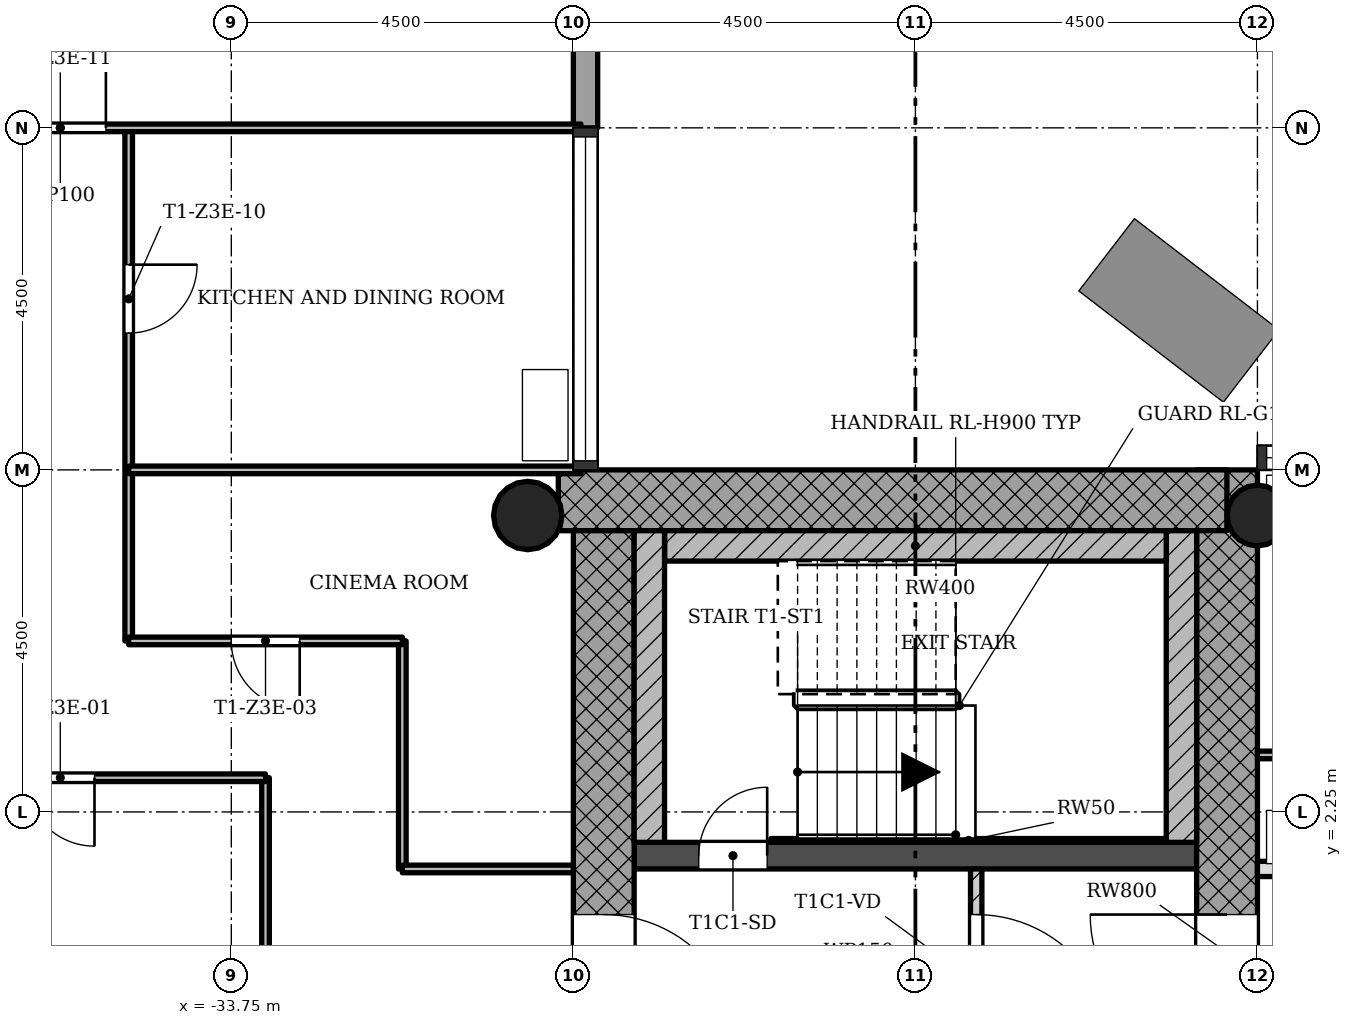
"""IFC4 building model, lengths in metres.
Left out: names, types, materials, properties, quantities, classifications, styles, units other than length and angle.
Written with IfcOpenShell. Run it as: python <this file> out.ifc"""

import sys

from ifc_helpers import new_model, si_unit, direction, frame, frame_2d, origin, origin_2d, place, context, subcontext, project, spatial, rectangle, hollow_circle, extrude, element, fill, save


model = new_model("IFC4")
c1 = context("Model", 3, precision=1e-05, world=origin(), true_north=direction((0.0, 1.0)))
c2 = subcontext(c1, "Body", "Model", "MODEL_VIEW")
j1 = project(units=[si_unit("LENGTHUNIT", "METRE"), si_unit("PLANEANGLEUNIT", "RADIAN")], contexts=[c1])
p1 = place(None, origin())
s1 = spatial("IfcSite", under=j1, at=p1, CompositionType="ELEMENT")
p2 = place(p1, origin())
s2 = spatial("IfcBuilding", under=s1, at=p2, CompositionType="ELEMENT")
p3 = place(p2, frame((0.0, 0.0, 177.9)))
s3 = spatial("IfcBuildingStorey", under=s2, at=p3, CompositionType="ELEMENT", Elevation=177.9)
p4 = place(p3, frame((-20.65, -5.95, 0.0), z_axis=(0.0, 0.0, 1.0), x_axis=(0.0, 1.0, 0.0)))
e1 = element("IfcWall", 1, at=p4, inside=s3, PredefinedType="SHEAR", context=c2, shape_type="SweptSolid", body=[
    extrude(rectangle(XDim=12.7, YDim=0.8, at=frame_2d((6.35, 0.0))), origin(), (0.0, 0.0, 1.0), 3.4),
])
p5 = place(p4, frame((5.05, 0.0, 0.0)))
e2 = element("IfcOpeningElement", 2, at=p5, cuts=e1, PredefinedType="OPENING", context=c2, shape_type="SweptSolid", body=[
    extrude(rectangle(XDim=1.8, YDim=2.1, at=frame_2d((0.9, 1.05))), frame((0.0, 0.41, 0.0), z_axis=(0.0, -1.0, 0.0), x_axis=(1.0, 0.0, 0.0)), (0.0, 0.0, 1.0), 0.82),
])
p6 = place(p3, frame((-20.652, 6.35, 0.0), z_axis=(0.0, 0.0, 1.0), x_axis=(-1.0, 0.0, 0.0)))
e3 = element("IfcWall", 3, at=p6, inside=s3, PredefinedType="SHEAR", context=c2, shape_type="SweptSolid", body=[
    extrude(rectangle(XDim=8.796, YDim=0.8, at=frame_2d((4.398, 0.0))), origin(), (0.0, 0.0, 1.0), 3.4),
])
p7 = place(p3, frame((-28.85, 5.95, 0.0), z_axis=(0.0, 0.0, 1.0), x_axis=(0.0, -1.0, 0.0)))
e4 = element("IfcWall", 4, at=p7, inside=s3, PredefinedType="SHEAR", context=c2, shape_type="SweptSolid", body=[
    extrude(rectangle(XDim=12.7, YDim=0.8, at=frame_2d((6.35, 0.0))), origin(), (0.0, 0.0, 1.0), 3.4),
])
p8 = place(p7, frame((5.05, 0.0, 0.0)))
e5 = element("IfcOpeningElement", 5, at=p8, cuts=e4, PredefinedType="OPENING", context=c2, shape_type="SweptSolid", body=[
    extrude(rectangle(XDim=1.8, YDim=2.1, at=frame_2d((0.9, 1.05))), frame((0.0, 0.41, 0.0), z_axis=(0.0, -1.0, 0.0), x_axis=(1.0, 0.0, 0.0)), (0.0, 0.0, 1.0), 0.82),
])
p9 = place(p3, frame((-28.45, 1.675, 0.0), z_axis=(0.0, 0.0, 1.0), x_axis=(1.0, 0.0, 0.0)))
e6 = element("IfcWall", 6, at=p9, inside=s3, PredefinedType="SHEAR", context=c2, shape_type="SweptSolid", body=[
    extrude(rectangle(XDim=7.4, YDim=0.35, at=frame_2d((3.7, 0.0))), origin(), (0.0, 0.0, 1.0), 3.4),
])
p10 = place(p9, frame((0.85, 0.0, 0.0)))
e7 = element("IfcOpeningElement", 7, at=p10, cuts=e6, PredefinedType="OPENING", context=c2, shape_type="SweptSolid", body=[
    extrude(rectangle(XDim=0.9, YDim=2.1, at=frame_2d((0.45, 1.05))), frame((0.0, 0.185, 0.0), z_axis=(0.0, -1.0, 0.0), x_axis=(1.0, 0.0, 0.0)), (0.0, 0.0, 1.0), 0.37),
])
p11 = place(p3, frame((-20.25, 6.15, 0.0), z_axis=(0.0, 0.0, 1.0), x_axis=(1.0, 0.0, 0.0)))
e8 = element("IfcColumn", 8, at=p11, inside=s3, PredefinedType="COLUMN", context=c2, shape_type="SweptSolid", body=[
    extrude(hollow_circle(Radius=0.4, WallThickness=0.028, at=origin_2d()), origin(), (0.0, 0.0, 1.0), 3.4),
])
p12 = place(p3, frame((-29.85, 6.15, 0.0), z_axis=(0.0, 0.0, 1.0), x_axis=(1.0, 0.0, 0.0)))
e9 = element("IfcColumn", 9, at=p12, inside=s3, PredefinedType="COLUMN", context=c2, shape_type="SweptSolid", body=[
    extrude(hollow_circle(Radius=0.45, WallThickness=0.032, at=origin_2d()), origin(), (0.0, 0.0, 1.0), 3.4),
])
p13 = place(p3, frame((-29.09, 11.25, -0.3), z_axis=(0.0, 0.0, 1.0), x_axis=(0.0, 1.0, 0.0)))
e10 = element("IfcWall", 10, at=p13, inside=s3, PredefinedType="STANDARD", context=c2, shape_type="SweptSolid", body=[
    extrude(rectangle(XDim=1.82, YDim=0.32, at=frame_2d((0.91, 0.0))), origin(), (0.0, 0.0, 1.0), 3.4),
])
p14 = place(p3, frame((-23.95, -1.5, 0.0), z_axis=(0.0, 0.0, 1.0), x_axis=(0.0, 1.0, 0.0)))
e11 = element("IfcWall", 11, at=p14, inside=s3, PredefinedType="PARTITIONING", context=c2, shape_type="SweptSolid", body=[
    extrude(rectangle(XDim=3.0, YDim=0.15, at=frame_2d((1.5, 0.0))), origin(), (0.0, 0.0, 1.0), 3.0),
])
p15 = place(p14, frame((0.6, 0.0, 0.0)))
e12 = element("IfcOpeningElement", 12, at=p15, cuts=e11, PredefinedType="OPENING", context=c2, shape_type="SweptSolid", body=[
    extrude(rectangle(XDim=1.8, YDim=2.1, at=frame_2d((0.9, 1.05))), frame((0.0, 0.085, 0.0), z_axis=(0.0, -1.0, 0.0), x_axis=(1.0, 0.0, 0.0)), (0.0, 0.0, 1.0), 0.17),
])
p16 = place(p3, frame((-35.1, 4.5, 0.0), z_axis=(0.0, 0.0, 1.0), x_axis=(0.0, 1.0, 0.0)))
e13 = element("IfcWall", 13, at=p16, inside=s3, PredefinedType="PARTITIONING", context=c2, shape_type="SweptSolid", body=[
    extrude(rectangle(XDim=6.75, YDim=0.1, at=frame_2d((3.375, 0.0))), origin(), (0.0, 0.0, 1.0), 3.0),
])
p17 = place(p16, frame((4.05, 0.0, 0.0)))
e14 = element("IfcOpeningElement", 14, at=p17, cuts=e13, PredefinedType="OPENING", context=c2, shape_type="SweptSolid", body=[
    extrude(rectangle(XDim=0.9, YDim=2.1, at=frame_2d((0.45, 1.05))), frame((0.0, 0.06, 0.0), z_axis=(0.0, -1.0, 0.0), x_axis=(1.0, 0.0, 0.0)), (0.0, 0.0, 1.0), 0.12),
])
p18 = place(p3, frame((-33.3, -2.7, 0.0), z_axis=(0.0, 0.0, 1.0), x_axis=(0.0, 1.0, 0.0)))
e15 = element("IfcWall", 15, at=p18, inside=s3, PredefinedType="PARTITIONING", context=c2, shape_type="SweptSolid", body=[
    extrude(rectangle(XDim=5.4, YDim=0.1, at=frame_2d((2.7, 0.0))), origin(), (0.0, 0.0, 1.0), 3.0),
])
p19 = place(p3, frame((-31.5, 1.5, 0.0), z_axis=(0.0, 0.0, 1.0), x_axis=(0.0, 1.0, 0.0)))
e16 = element("IfcWall", 16, at=p19, inside=s3, PredefinedType="PARTITIONING", context=c2, shape_type="SweptSolid", body=[
    extrude(rectangle(XDim=3.0, YDim=0.1, at=frame_2d((1.5, 0.0))), origin(), (0.0, 0.0, 1.0), 3.0),
])
p20 = place(p3, frame((-31.5, 1.5, 0.0), z_axis=(0.0, 0.0, 1.0), x_axis=(1.0, 0.0, 0.0)))
e17 = element("IfcWall", 17, at=p20, inside=s3, PredefinedType="PARTITIONING", context=c2, shape_type="SweptSolid", body=[
    extrude(rectangle(XDim=2.25, YDim=0.1, at=frame_2d((1.125, 0.0))), origin(), (0.0, 0.0, 1.0), 3.0),
])
p21 = place(p3, frame((-20.25, 1.5, 0.0), z_axis=(0.0, 0.0, 1.0), x_axis=(1.0, 0.0, 0.0)))
e18 = element("IfcWall", 18, at=p21, inside=s3, PredefinedType="SOLIDWALL", context=c2, shape_type="SweptSolid", body=[
    extrude(rectangle(XDim=4.5, YDim=0.2, at=frame_2d((2.25, 0.0))), origin(), (0.0, 0.0, 1.0), 3.0),
])
p22 = place(p21, frame((3.0, 0.0, 0.0)))
e19 = element("IfcOpeningElement", 19, at=p22, cuts=e18, PredefinedType="OPENING", context=c2, shape_type="SweptSolid", body=[
    extrude(rectangle(XDim=0.9, YDim=2.1, at=frame_2d((0.45, 1.05))), frame((0.0, 0.11, 0.0), z_axis=(0.0, -1.0, 0.0), x_axis=(1.0, 0.0, 0.0)), (0.0, 0.0, 1.0), 0.22),
])
p23 = place(p3, frame((-38.7, 2.7, 0.0), z_axis=(0.0, 0.0, 1.0), x_axis=(1.0, 0.0, 0.0)))
e20 = element("IfcWall", 20, at=p23, inside=s3, PredefinedType="PARTITIONING", context=c2, shape_type="SweptSolid", body=[
    extrude(rectangle(XDim=5.4, YDim=0.1, at=frame_2d((2.7, 0.0))), origin(), (0.0, 0.0, 1.0), 3.0),
])
p24 = place(p23, frame((2.25, 0.0, 0.0)))
e21 = element("IfcOpeningElement", 21, at=p24, cuts=e20, PredefinedType="OPENING", context=c2, shape_type="SweptSolid", body=[
    extrude(rectangle(XDim=0.9, YDim=2.1, at=frame_2d((0.45, 1.05))), frame((0.0, 0.06, 0.0), z_axis=(0.0, -1.0, 0.0), x_axis=(1.0, 0.0, 0.0)), (0.0, 0.0, 1.0), 0.12),
])
p25 = place(p3, frame((-20.25, 3.0, 0.0), z_axis=(0.0, 0.0, 1.0), x_axis=(1.0, 0.0, 0.0)))
e22 = element("IfcWall", 22, at=p25, inside=s3, PredefinedType="PARTITIONING", context=c2, shape_type="SweptSolid", body=[
    extrude(rectangle(XDim=2.4, YDim=0.1, at=frame_2d((1.2, 0.0))), origin(), (0.0, 0.0, 1.0), 3.0),
])
p26 = place(p25, frame((0.75, 0.0, 0.0)))
e23 = element("IfcOpeningElement", 23, at=p26, cuts=e22, PredefinedType="OPENING", context=c2, shape_type="SweptSolid", body=[
    extrude(rectangle(XDim=0.9, YDim=2.1, at=frame_2d((0.45, 1.05))), frame((0.0, 0.06, 0.0), z_axis=(0.0, -1.0, 0.0), x_axis=(1.0, 0.0, 0.0)), (0.0, 0.0, 1.0), 0.12),
])
p27 = place(p3, frame((-35.1, 4.5, 0.0), z_axis=(0.0, 0.0, 1.0), x_axis=(1.0, 0.0, 0.0)))
e24 = element("IfcWall", 24, at=p27, inside=s3, PredefinedType="PARTITIONING", context=c2, shape_type="SweptSolid", body=[
    extrude(rectangle(XDim=3.6, YDim=0.1, at=frame_2d((1.8, 0.0))), origin(), (0.0, 0.0, 1.0), 3.0),
])
p28 = place(p27, frame((1.35, 0.0, 0.0)))
e25 = element("IfcOpeningElement", 25, at=p28, cuts=e24, PredefinedType="OPENING", context=c2, shape_type="SweptSolid", body=[
    extrude(rectangle(XDim=0.9, YDim=2.1, at=frame_2d((0.45, 1.05))), frame((0.0, 0.06, 0.0), z_axis=(0.0, -1.0, 0.0), x_axis=(1.0, 0.0, 0.0)), (0.0, 0.0, 1.0), 0.12),
])
p29 = place(p3, frame((-35.1, 6.75, 0.0), z_axis=(0.0, 0.0, 1.0), x_axis=(1.0, 0.0, 0.0)))
e26 = element("IfcWall", 26, at=p29, inside=s3, PredefinedType="PARTITIONING", context=c2, shape_type="SweptSolid", body=[
    extrude(rectangle(XDim=5.95, YDim=0.1, at=frame_2d((2.975, 0.0))), origin(), (0.0, 0.0, 1.0), 3.0),
])
p30 = place(p3, frame((-42.85, 11.25, 0.0), z_axis=(0.0, 0.0, 1.0), x_axis=(1.0, 0.0, 0.0)))
e27 = element("IfcWall", 27, at=p30, inside=s3, PredefinedType="PARTITIONING", context=c2, shape_type="SweptSolid", body=[
    extrude(rectangle(XDim=13.7, YDim=0.1, at=frame_2d((6.85, 0.0))), origin(), (0.0, 0.0, 1.0), 3.0),
])
p31 = place(p30, frame((6.25, 0.0, 0.0)))
e28 = element("IfcOpeningElement", 28, at=p31, cuts=e27, PredefinedType="OPENING", context=c2, shape_type="SweptSolid", body=[
    extrude(rectangle(XDim=1.2, YDim=2.1, at=frame_2d((0.6, 1.05))), frame((0.0, 0.06, 0.0), z_axis=(0.0, -1.0, 0.0), x_axis=(1.0, 0.0, 0.0)), (0.0, 0.0, 1.0), 0.12),
])
p32 = place(p3, frame((-21.25, 1.85, 0.0), z_axis=(0.0, 0.0, 1.0), x_axis=(0.0, 1.0, 0.0)))
e29 = element("IfcWall", 29, at=p32, inside=s3, PredefinedType="SHEAR", context=c2, shape_type="SweptSolid", body=[
    extrude(rectangle(XDim=4.1, YDim=0.4, at=frame_2d((2.05, 0.0))), origin(), (0.0, 0.0, 1.0), 3.4),
])
p33 = place(p3, frame((-28.05, 5.75, 0.0), z_axis=(0.0, 0.0, 1.0), x_axis=(1.0, 0.0, 0.0)))
e30 = element("IfcWall", 30, at=p33, inside=s3, PredefinedType="SHEAR", context=c2, shape_type="SweptSolid", body=[
    extrude(rectangle(XDim=6.6, YDim=0.4, at=frame_2d((3.3, 0.0))), origin(), (0.0, 0.0, 1.0), 3.4),
])
p34 = place(p3, frame((-28.25, 1.85, 0.0), z_axis=(0.0, 0.0, 1.0), x_axis=(0.0, 1.0, 0.0)))
e31 = element("IfcWall", 31, at=p34, inside=s3, PredefinedType="SHEAR", context=c2, shape_type="SweptSolid", body=[
    extrude(rectangle(XDim=4.1, YDim=0.4, at=frame_2d((2.05, 0.0))), origin(), (0.0, 0.0, 1.0), 3.4),
])
p35 = place(p3, frame((-26.65, 1.875, 0.0), z_axis=(0.0, 0.0, 1.0), x_axis=(1.0, 0.0, 0.0)))
e32 = element("IfcWall", 32, at=p35, inside=s3, PredefinedType="SHEAR", context=c2, shape_type="SweptSolid", body=[
    extrude(rectangle(XDim=5.2, YDim=0.05, at=frame_2d((2.6, 0.0))), origin(), (0.0, 0.0, 1.0), 3.4),
])
p36 = place(p15, origin())
e33 = element("IfcDoor", 33, at=p36, inside=s3, OperationType="SINGLE_SWING_LEFT", PredefinedType="DOOR", context=c2, shape_type="SweptSolid", body=[
    extrude(rectangle(XDim=1.8, YDim=2.1, at=frame_2d((0.9, 1.05))), frame((0.0, 0.025, 0.0), z_axis=(0.0, -1.0, 0.0), x_axis=(1.0, 0.0, 0.0)), (0.0, 0.0, 1.0), 0.05),
])
fill(e12, e33)
p37 = place(p24, origin())
e34 = element("IfcDoor", 34, at=p37, inside=s3, OperationType="SINGLE_SWING_RIGHT", PredefinedType="DOOR", context=c2, shape_type="SweptSolid", body=[
    extrude(rectangle(XDim=0.9, YDim=2.1, at=frame_2d((0.45, 1.05))), frame((0.0, 0.025, 0.0), z_axis=(0.0, -1.0, 0.0), x_axis=(1.0, 0.0, 0.0)), (0.0, 0.0, 1.0), 0.05),
])
fill(e21, e34)
p38 = place(p28, origin())
e35 = element("IfcDoor", 35, at=p38, inside=s3, OperationType="SINGLE_SWING_RIGHT", PredefinedType="DOOR", context=c2, shape_type="SweptSolid", body=[
    extrude(rectangle(XDim=0.9, YDim=2.1, at=frame_2d((0.45, 1.05))), frame((0.0, 0.025, 0.0), z_axis=(0.0, -1.0, 0.0), x_axis=(1.0, 0.0, 0.0)), (0.0, 0.0, 1.0), 0.05),
])
fill(e25, e35)
p39 = place(p17, origin())
e36 = element("IfcDoor", 36, at=p39, inside=s3, OperationType="SINGLE_SWING_RIGHT", PredefinedType="DOOR", context=c2, shape_type="SweptSolid", body=[
    extrude(rectangle(XDim=0.9, YDim=2.1, at=frame_2d((0.45, 1.05))), frame((0.0, 0.025, 0.0), z_axis=(0.0, -1.0, 0.0), x_axis=(1.0, 0.0, 0.0)), (0.0, 0.0, 1.0), 0.05),
])
fill(e14, e36)
p40 = place(p31, origin())
e37 = element("IfcDoor", 37, at=p40, inside=s3, OperationType="SINGLE_SWING_LEFT", PredefinedType="DOOR", context=c2, shape_type="SweptSolid", body=[
    extrude(rectangle(XDim=1.2, YDim=2.1, at=frame_2d((0.6, 1.05))), frame((0.0, 0.025, 0.0), z_axis=(0.0, -1.0, 0.0), x_axis=(1.0, 0.0, 0.0)), (0.0, 0.0, 1.0), 0.05),
])
fill(e28, e37)
p41 = place(p10, origin())
e38 = element("IfcDoor", 38, at=p41, inside=s3, OperationType="SINGLE_SWING_LEFT", PredefinedType="DOOR", context=c2, shape_type="SweptSolid", body=[
    extrude(rectangle(XDim=0.9, YDim=2.1, at=frame_2d((0.45, 1.05))), frame((0.0, 0.025, 0.0), z_axis=(0.0, -1.0, 0.0), x_axis=(1.0, 0.0, 0.0)), (0.0, 0.0, 1.0), 0.05),
])
fill(e7, e38)
p42 = place(p8, origin())
e39 = element("IfcDoor", 39, at=p42, inside=s3, OperationType="SINGLE_SWING_LEFT", PredefinedType="DOOR", context=c2, shape_type="SweptSolid", body=[
    extrude(rectangle(XDim=1.8, YDim=2.1, at=frame_2d((0.9, 1.05))), frame((0.0, 0.025, 0.0), z_axis=(0.0, -1.0, 0.0), x_axis=(1.0, 0.0, 0.0)), (0.0, 0.0, 1.0), 0.05),
])
fill(e5, e39)
p43 = place(p5, origin())
e40 = element("IfcDoor", 40, at=p43, inside=s3, OperationType="SINGLE_SWING_LEFT", PredefinedType="DOOR", context=c2, shape_type="SweptSolid", body=[
    extrude(rectangle(XDim=1.8, YDim=2.1, at=frame_2d((0.9, 1.05))), frame((0.0, 0.025, 0.0), z_axis=(0.0, -1.0, 0.0), x_axis=(1.0, 0.0, 0.0)), (0.0, 0.0, 1.0), 0.05),
])
fill(e2, e40)
save(model, sys.argv[1])
